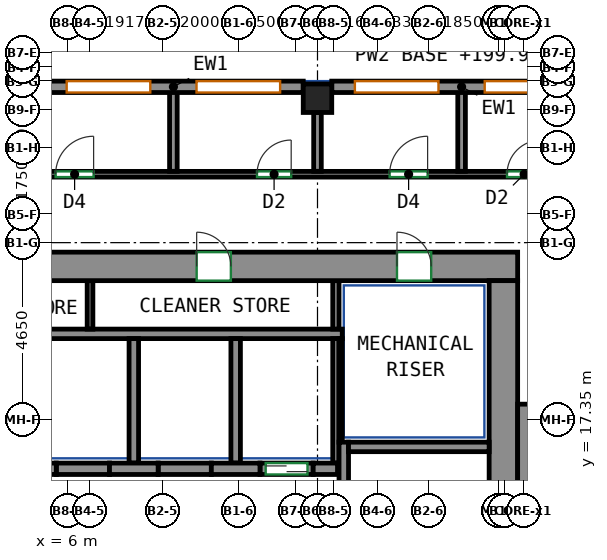
"""IFC4 building model, lengths in metres.
Left out: names, types, materials, properties, quantities, classifications, styles, units other than length and angle.
Written with IfcOpenShell. Run it as: python <this file> out.ifc"""

import sys

from ifc_helpers import new_model, si_unit, direction, frame, frame_2d, origin, origin_2d, place, context, subcontext, project, spatial, rectangle, extrude, source, transform, mapped, element, fill, save


model = new_model("IFC4")
c1 = context("Model", 3, precision=1e-05, world=origin(), true_north=direction((0.0, 1.0)))
c2 = subcontext(c1, "Body", "Model", "MODEL_VIEW")
j1 = project(units=[si_unit("LENGTHUNIT", "METRE"), si_unit("PLANEANGLEUNIT", "RADIAN")], contexts=[c1])
p1 = place(None, origin())
s1 = spatial("IfcSite", under=j1, at=p1, CompositionType="ELEMENT")
p2 = place(p1, origin())
s2 = spatial("IfcBuilding", under=s1, at=p2, CompositionType="ELEMENT")
p3 = place(p2, frame((0.0, 0.0, 199.9)))
s3 = spatial("IfcBuildingStorey", under=s2, at=p3, CompositionType="ELEMENT", Elevation=199.9)
m1 = source(origin(), c2, "Body", "SweptSolid", [
    extrude(rectangle(XDim=0.75, YDim=0.75, at=origin_2d()), origin(), (0.0, 0.0, 1.0), 3.12),
])
p4 = place(p3, frame((12.583, 25.8, 0.0), z_axis=(0.0, 0.0, 1.0), x_axis=(1.0, 0.0, 0.0)))
e1 = element("IfcColumn", 1, at=p4, inside=s3, PredefinedType="COLUMN", context=c2, shape_type="MappedRepresentation", body=[
    mapped(m1, transform((0.0, 0.0, 0.0))),
])
m2 = source(origin(), c2, "Body", "SweptSolid", [
    extrude(rectangle(XDim=33.6, YDim=0.75, at=frame_2d((16.8, 0.0))), origin(), (0.0, 0.0, 1.0), 3.12),
])
p5 = place(p3, frame((-15.75, 21.375, 0.0), z_axis=(0.0, 0.0, 1.0), x_axis=(1.0, 0.0, 0.0)))
e2 = element("IfcWall", 2, at=p5, inside=s3, PredefinedType="SHEAR", context=c2, shape_type="MappedRepresentation", body=[
    mapped(m2, transform((0.0, 0.0, 0.0))),
])
p6 = place(p5, frame((8.27, 0.0, 0.0)))
e3 = element("IfcOpeningElement", 3, at=p6, cuts=e2, PredefinedType="OPENING", context=c2, shape_type="SweptSolid", body=[
    extrude(rectangle(XDim=0.9, YDim=2.1, at=frame_2d((0.45, 1.05))), frame((0.0, 0.385, 0.0), z_axis=(0.0, -1.0, 0.0), x_axis=(1.0, 0.0, 0.0)), (0.0, 0.0, 1.0), 0.77),
])
p7 = place(p5, frame((14.97, 0.0, 0.0)))
e4 = element("IfcOpeningElement", 4, at=p7, cuts=e2, PredefinedType="OPENING", context=c2, shape_type="SweptSolid", body=[
    extrude(rectangle(XDim=0.9, YDim=2.1, at=frame_2d((0.45, 1.05))), frame((0.0, 0.385, 0.0), z_axis=(0.0, -1.0, 0.0), x_axis=(1.0, 0.0, 0.0)), (0.0, 0.0, 1.0), 0.77),
])
p8 = place(p5, frame((19.794, 0.0, 0.0)))
e5 = element("IfcOpeningElement", 5, at=p8, cuts=e2, PredefinedType="OPENING", context=c2, shape_type="SweptSolid", body=[
    extrude(rectangle(XDim=0.9, YDim=2.1, at=frame_2d((0.45, 1.05))), frame((0.0, 0.385, 0.0), z_axis=(0.0, -1.0, 0.0), x_axis=(1.0, 0.0, 0.0)), (0.0, 0.0, 1.0), 0.77),
])
p9 = place(p5, frame((25.154, 0.0, 0.0)))
e6 = element("IfcOpeningElement", 6, at=p9, cuts=e2, PredefinedType="OPENING", context=c2, shape_type="SweptSolid", body=[
    extrude(rectangle(XDim=0.9, YDim=2.1, at=frame_2d((0.45, 1.05))), frame((0.0, 0.385, 0.0), z_axis=(0.0, -1.0, 0.0), x_axis=(1.0, 0.0, 0.0)), (0.0, 0.0, 1.0), 0.77),
])
p10 = place(p5, frame((2.275, 0.0, 0.0)))
e7 = element("IfcOpeningElement", 7, at=p10, cuts=e2, PredefinedType="OPENING", context=c2, shape_type="SweptSolid", body=[
    extrude(rectangle(XDim=0.9, YDim=2.1, at=frame_2d((0.45, 1.05))), frame((0.0, 0.385, 0.0), z_axis=(0.0, -1.0, 0.0), x_axis=(1.0, 0.0, 0.0)), (0.0, 0.0, 1.0), 0.77),
])
p11 = place(p5, frame((30.425, 0.0, 0.0)))
e8 = element("IfcOpeningElement", 8, at=p11, cuts=e2, PredefinedType="OPENING", context=c2, shape_type="SweptSolid", body=[
    extrude(rectangle(XDim=0.9, YDim=2.1, at=frame_2d((0.45, 1.05))), frame((0.0, 0.385, 0.0), z_axis=(0.0, -1.0, 0.0), x_axis=(1.0, 0.0, 0.0)), (0.0, 0.0, 1.0), 0.77),
])
m3 = source(origin(), c2, "Body", "SweptSolid", [
    extrude(rectangle(XDim=12.0, YDim=0.75, at=frame_2d((6.0, 0.0))), origin(), (0.0, 0.0, 1.0), 3.12),
])
p12 = place(p3, frame((17.475, 9.0, 0.0), z_axis=(0.0, 0.0, 1.0), x_axis=(0.0, 1.0, 0.0)))
e9 = element("IfcWall", 9, at=p12, inside=s3, PredefinedType="SHEAR", context=c2, shape_type="MappedRepresentation", body=[
    mapped(m3, transform((0.0, 0.0, 0.0))),
])
m4 = source(origin(), c2, "Body", "SweptSolid", [
    extrude(rectangle(XDim=7.75, YDim=0.25, at=frame_2d((3.875, 0.0))), origin(), (0.0, 0.0, 1.0), 3.12),
])
p13 = place(p3, frame((13.275, 9.0, 0.0), z_axis=(0.0, 0.0, 1.0), x_axis=(0.0, 1.0, 0.0)))
e10 = element("IfcWall", 10, at=p13, inside=s3, PredefinedType="SHEAR", context=c2, shape_type="MappedRepresentation", body=[
    mapped(m4, transform((0.0, 0.0, 0.0))),
])
m5 = source(origin(), c2, "Body", "SweptSolid", [
    extrude(rectangle(XDim=3.7, YDim=0.25, at=frame_2d((1.85, 0.0))), origin(), (0.0, 0.0, 1.0), 3.12),
])
p14 = place(p3, frame((13.4, 16.625, 0.0), z_axis=(0.0, 0.0, 1.0), x_axis=(1.0, 0.0, 0.0)))
e11 = element("IfcWall", 11, at=p14, inside=s3, PredefinedType="SHEAR", context=c2, shape_type="MappedRepresentation", body=[
    mapped(m5, transform((0.0, 0.0, 0.0))),
])
m6 = source(origin(), c2, "Body", "SweptSolid", [
    extrude(rectangle(XDim=8.0, YDim=0.5, at=frame_2d((4.0, 0.0))), origin(), (0.0, 0.0, 1.0), 3.12),
])
p15 = place(p3, frame((18.1, 9.75, 0.0), z_axis=(0.0, 0.0, 1.0), x_axis=(0.0, 1.0, 0.0)))
e12 = element("IfcWall", 12, at=p15, inside=s3, PredefinedType="SHEAR", context=c2, shape_type="MappedRepresentation", body=[
    mapped(m6, transform((0.0, 0.0, 0.0))),
])
m7 = source(origin(), c2, "Body", "SweptSolid", [
    extrude(rectangle(XDim=1.28, YDim=0.3, at=frame_2d((0.64, 0.0))), origin(), (0.0, 0.0, 1.0), 3.12),
])
p16 = place(p3, frame((4.43, 16.05, 0.0), z_axis=(0.0, 0.0, 1.0), x_axis=(1.0, 0.0, 0.0)))
e13 = element("IfcWall", 13, at=p16, inside=s3, PredefinedType="SHEAR", context=c2, shape_type="MappedRepresentation", body=[
    mapped(m7, transform((0.0, 0.0, 0.0))),
])
m8 = source(origin(), c2, "Body", "SweptSolid", [
    extrude(rectangle(XDim=1.28, YDim=0.3, at=frame_2d((0.64, 0.0))), origin(), (0.0, 0.0, 1.0), 3.12),
])
p17 = place(p3, frame((7.11, 16.05, 0.0), z_axis=(0.0, 0.0, 1.0), x_axis=(1.0, 0.0, 0.0)))
e14 = element("IfcWall", 14, at=p17, inside=s3, PredefinedType="SHEAR", context=c2, shape_type="MappedRepresentation", body=[
    mapped(m8, transform((0.0, 0.0, 0.0))),
])
p18 = place(p3, frame((9.79, 16.05, 0.0), z_axis=(0.0, 0.0, 1.0), x_axis=(1.0, 0.0, 0.0)))
e15 = element("IfcWall", 15, at=p18, inside=s3, PredefinedType="SHEAR", context=c2, shape_type="MappedRepresentation", body=[
    mapped(m7, transform((0.0, 0.0, 0.0))),
])
m9 = source(origin(), c2, "Body", "SweptSolid", [
    extrude(rectangle(XDim=0.64, YDim=0.3, at=frame_2d((0.32, 0.0))), origin(), (0.0, 0.0, 1.0), 3.12),
])
p19 = place(p3, frame((12.47, 16.05, 0.0), z_axis=(0.0, 0.0, 1.0), x_axis=(1.0, 0.0, 0.0)))
e16 = element("IfcWall", 16, at=p19, inside=s3, PredefinedType="SHEAR", context=c2, shape_type="MappedRepresentation", body=[
    mapped(m9, transform((0.0, 0.0, 0.0))),
])
m10 = source(origin(), c2, "Body", "SweptSolid", [
    extrude(rectangle(XDim=6.833, YDim=0.3, at=frame_2d((3.417, 0.0))), origin(), (0.0, 0.0, 1.0), 3.12),
])
p20 = place(p3, frame((19.792, 26.1, 0.0), z_axis=(0.0, 0.0, 1.0), x_axis=(-1.0, 0.0, 0.0)))
e17 = element("IfcWall", 17, at=p20, inside=s3, PredefinedType="SOLIDWALL", context=c2, shape_type="MappedRepresentation", body=[
    mapped(m10, transform((0.0, 0.0, 0.0))),
])
p21 = place(p20, frame((0.608, 0.0, 0.85)))
e18 = element("IfcOpeningElement", 18, at=p21, cuts=e17, PredefinedType="OPENING", context=c2, shape_type="SweptSolid", body=[
    extrude(rectangle(XDim=2.2, YDim=1.95, at=frame_2d((1.1, 0.975))), frame((0.0, 0.16, 0.0), z_axis=(0.0, -1.0, 0.0), x_axis=(1.0, 0.0, 0.0)), (0.0, 0.0, 1.0), 0.32),
])
p22 = place(p20, frame((4.025, 0.0, 0.85)))
e19 = element("IfcOpeningElement", 19, at=p22, cuts=e17, PredefinedType="OPENING", context=c2, shape_type="SweptSolid", body=[
    extrude(rectangle(XDim=2.2, YDim=1.95, at=frame_2d((1.1, 0.975))), frame((0.0, 0.16, 0.0), z_axis=(0.0, -1.0, 0.0), x_axis=(1.0, 0.0, 0.0)), (0.0, 0.0, 1.0), 0.32),
])
m11 = source(origin(), c2, "Body", "SweptSolid", [
    extrude(rectangle(XDim=6.833, YDim=0.3, at=frame_2d((3.417, 0.0))), origin(), (0.0, 0.0, 1.0), 3.12),
])
p23 = place(p3, frame((12.208, 26.1, 0.0), z_axis=(0.0, 0.0, 1.0), x_axis=(-1.0, 0.0, 0.0)))
e20 = element("IfcWall", 20, at=p23, inside=s3, PredefinedType="SOLIDWALL", context=c2, shape_type="MappedRepresentation", body=[
    mapped(m11, transform((0.0, 0.0, 0.0))),
])
p24 = place(p23, frame((0.608, 0.0, 0.85)))
e21 = element("IfcOpeningElement", 21, at=p24, cuts=e20, PredefinedType="OPENING", context=c2, shape_type="SweptSolid", body=[
    extrude(rectangle(XDim=2.2, YDim=1.95, at=frame_2d((1.1, 0.975))), frame((0.0, 0.16, 0.0), z_axis=(0.0, -1.0, 0.0), x_axis=(1.0, 0.0, 0.0)), (0.0, 0.0, 1.0), 0.32),
])
p25 = place(p23, frame((4.025, 0.0, 0.85)))
e22 = element("IfcOpeningElement", 22, at=p25, cuts=e20, PredefinedType="OPENING", context=c2, shape_type="SweptSolid", body=[
    extrude(rectangle(XDim=2.2, YDim=1.95, at=frame_2d((1.1, 0.975))), frame((0.0, 0.16, 0.0), z_axis=(0.0, -1.0, 0.0), x_axis=(1.0, 0.0, 0.0)), (0.0, 0.0, 1.0), 0.32),
])
m12 = source(origin(), c2, "Body", "SweptSolid", [
    extrude(rectangle(XDim=1.4, YDim=0.3, at=frame_2d((0.7, 0.0))), origin(), (0.0, 0.0, 1.0), 3.12),
])
p26 = place(p3, frame((11.07, 16.05, 0.0), z_axis=(0.0, 0.0, 1.0), x_axis=(1.0, 0.0, 0.0)))
e23 = element("IfcWall", 23, at=p26, inside=s3, PredefinedType="PARTITIONING", context=c2, shape_type="MappedRepresentation", body=[
    mapped(m12, transform((0.0, 0.0, 0.0))),
])
p27 = place(p26, frame((0.15, 0.0, 0.0)))
e24 = element("IfcOpeningElement", 24, at=p27, cuts=e23, PredefinedType="OPENING", context=c2, shape_type="SweptSolid", body=[
    extrude(rectangle(XDim=1.1, YDim=2.1, at=frame_2d((0.55, 1.05))), frame((0.0, 0.16, 0.0), z_axis=(0.0, -1.0, 0.0), x_axis=(1.0, 0.0, 0.0)), (0.0, 0.0, 1.0), 0.32),
])
m13 = source(origin(), c2, "Body", "SweptSolid", [
    extrude(rectangle(XDim=1.4, YDim=0.3, at=frame_2d((0.7, 0.0))), origin(), (0.0, 0.0, 1.0), 3.12),
])
for number, where, z_axis, x_axis in (
    (25, (5.71, 16.05, 0.0), (0.0, 0.0, 1.0), (1.0, 0.0, 0.0)),
    (26, (8.39, 16.05, 0.0), (0.0, 0.0, 1.0), (1.0, 0.0, 0.0)),
):
    element("IfcWall", number, at=place(p3, frame(where, z_axis=z_axis, x_axis=x_axis)), inside=s3, PredefinedType="PARTITIONING", context=c2, shape_type="MappedRepresentation", body=[
        mapped(m13, transform((0.0, 0.0, 0.0))),
    ])
m14 = source(origin(), c2, "Body", "SweptSolid", [
    extrude(rectangle(XDim=10.97, YDim=0.25, at=frame_2d((5.485, 0.0))), origin(), (0.0, 0.0, 1.0), 3.12),
])
p28 = place(p3, frame((2.265, 19.6, 0.0), z_axis=(0.0, 0.0, 1.0), x_axis=(1.0, 0.0, 0.0)))
e27 = element("IfcWall", 27, at=p28, inside=s3, PredefinedType="PARTITIONING", context=c2, shape_type="MappedRepresentation", body=[
    mapped(m14, transform((0.0, 0.0, 0.0))),
])
m15 = source(origin(), c2, "Body", "SweptSolid", [
    extrude(rectangle(XDim=3.275, YDim=0.165, at=frame_2d((1.638, 0.0))), origin(), (0.0, 0.0, 1.0), 3.12),
])
p29 = place(p3, frame((13.067, 16.2, 0.0), z_axis=(0.0, 0.0, 1.0), x_axis=(0.0, 1.0, 0.0)))
e28 = element("IfcWall", 28, at=p29, inside=s3, PredefinedType="PARTITIONING", context=c2, shape_type="MappedRepresentation", body=[
    mapped(m15, transform((0.0, 0.0, 0.0))),
])
m16 = source(origin(), c2, "Body", "SweptSolid", [
    extrude(rectangle(XDim=1.275, YDim=0.165, at=frame_2d((0.637, 0.0))), origin(), (0.0, 0.0, 1.0), 3.12),
])
p30 = place(p3, frame((13.067, 19.725, 0.0), z_axis=(0.0, 0.0, 1.0), x_axis=(0.0, 1.0, 0.0)))
e29 = element("IfcWall", 29, at=p30, inside=s3, PredefinedType="PARTITIONING", context=c2, shape_type="MappedRepresentation", body=[
    mapped(m16, transform((0.0, 0.0, 0.0))),
])
m17 = source(origin(), c2, "Body", "SweptSolid", [
    extrude(rectangle(XDim=3.275, YDim=0.25, at=frame_2d((1.638, 0.0))), origin(), (0.0, 0.0, 1.0), 3.12),
])
p31 = place(p3, frame((10.43, 16.2, 0.0), z_axis=(0.0, 0.0, 1.0), x_axis=(0.0, 1.0, 0.0)))
e30 = element("IfcWall", 30, at=p31, inside=s3, PredefinedType="PARTITIONING", context=c2, shape_type="MappedRepresentation", body=[
    mapped(m17, transform((0.0, 0.0, 0.0))),
])
m18 = source(origin(), c2, "Body", "SweptSolid", [
    extrude(rectangle(XDim=2.725, YDim=0.085, at=frame_2d((1.363, 0.0))), origin(), (0.0, 0.0, 1.0), 3.12),
])
p32 = place(p3, frame((13.192, 16.75, 0.0), z_axis=(0.0, 0.0, 1.0), x_axis=(0.0, 1.0, 0.0)))
e31 = element("IfcWall", 31, at=p32, inside=s3, PredefinedType="PARTITIONING", context=c2, shape_type="MappedRepresentation", body=[
    mapped(m18, transform((0.0, 0.0, 0.0))),
])
p33 = place(p3, frame((7.75, 16.2, 0.0), z_axis=(0.0, 0.0, 1.0), x_axis=(0.0, 1.0, 0.0)))
e32 = element("IfcWall", 32, at=p33, inside=s3, PredefinedType="PARTITIONING", context=c2, shape_type="MappedRepresentation", body=[
    mapped(m17, transform((0.0, 0.0, 0.0))),
])
m19 = source(origin(), c2, "Body", "SweptSolid", [
    extrude(rectangle(XDim=1.275, YDim=0.15, at=frame_2d((0.637, 0.0))), origin(), (0.0, 0.0, 1.0), 3.12),
])
p34 = place(p3, frame((6.598, 19.725, 0.0), z_axis=(0.0, 0.0, 1.0), x_axis=(0.0, 1.0, 0.0)))
e33 = element("IfcWall", 33, at=p34, inside=s3, PredefinedType="PARTITIONING", context=c2, shape_type="MappedRepresentation", body=[
    mapped(m19, transform((0.0, 0.0, 0.0))),
])
p35 = place(p3, frame((-17.85, 23.8, 0.0), z_axis=(0.0, 0.0, 1.0), x_axis=(1.0, 0.0, 0.0)))
e34 = element("IfcWall", 34, at=p35, inside=s3, PredefinedType="PARTITIONING", context=c2, shape_type="SweptSolid", body=[
    extrude(rectangle(XDim=45.7, YDim=0.15, at=frame_2d((22.85, 0.0))), origin(), (0.0, 0.0, 1.0), 3.12),
])
p36 = place(p35, frame((0.6, 0.0, 0.0)))
e35 = element("IfcOpeningElement", 35, at=p36, cuts=e34, PredefinedType="OPENING", context=c2, shape_type="SweptSolid", body=[
    extrude(rectangle(XDim=0.9, YDim=2.1, at=frame_2d((0.45, 1.05))), frame((0.0, 0.085, 0.0), z_axis=(0.0, -1.0, 0.0), x_axis=(1.0, 0.0, 0.0)), (0.0, 0.0, 1.0), 0.17),
])
p37 = place(p35, frame((4.081, 0.0, 0.0)))
e36 = element("IfcOpeningElement", 36, at=p37, cuts=e34, PredefinedType="OPENING", context=c2, shape_type="SweptSolid", body=[
    extrude(rectangle(XDim=1.0, YDim=2.1, at=frame_2d((0.5, 1.05))), frame((0.0, 0.085, 0.0), z_axis=(0.0, -1.0, 0.0), x_axis=(1.0, 0.0, 0.0)), (0.0, 0.0, 1.0), 0.17),
])
p38 = place(p35, frame((9.481, 0.0, 0.0)))
e37 = element("IfcOpeningElement", 37, at=p38, cuts=e34, PredefinedType="OPENING", context=c2, shape_type="SweptSolid", body=[
    extrude(rectangle(XDim=0.9, YDim=2.1, at=frame_2d((0.45, 1.05))), frame((0.0, 0.085, 0.0), z_axis=(0.0, -1.0, 0.0), x_axis=(1.0, 0.0, 0.0)), (0.0, 0.0, 1.0), 0.17),
])
p39 = place(p35, frame((12.803, 0.0, 0.0)))
e38 = element("IfcOpeningElement", 38, at=p39, cuts=e34, PredefinedType="OPENING", context=c2, shape_type="SweptSolid", body=[
    extrude(rectangle(XDim=1.0, YDim=2.1, at=frame_2d((0.5, 1.05))), frame((0.0, 0.085, 0.0), z_axis=(0.0, -1.0, 0.0), x_axis=(1.0, 0.0, 0.0)), (0.0, 0.0, 1.0), 0.17),
])
p40 = place(p35, frame((15.489, 0.0, 0.0)))
e39 = element("IfcOpeningElement", 39, at=p40, cuts=e34, PredefinedType="OPENING", context=c2, shape_type="SweptSolid", body=[
    extrude(rectangle(XDim=0.9, YDim=2.1, at=frame_2d((0.45, 1.05))), frame((0.0, 0.085, 0.0), z_axis=(0.0, -1.0, 0.0), x_axis=(1.0, 0.0, 0.0)), (0.0, 0.0, 1.0), 0.17),
])
p41 = place(p35, frame((21.244, 0.0, 0.0)))
e40 = element("IfcOpeningElement", 40, at=p41, cuts=e34, PredefinedType="OPENING", context=c2, shape_type="SweptSolid", body=[
    extrude(rectangle(XDim=0.9, YDim=2.1, at=frame_2d((0.45, 1.05))), frame((0.0, 0.085, 0.0), z_axis=(0.0, -1.0, 0.0), x_axis=(1.0, 0.0, 0.0)), (0.0, 0.0, 1.0), 0.17),
])
p42 = place(p35, frame((23.542, 0.0, 0.0)))
e41 = element("IfcOpeningElement", 41, at=p42, cuts=e34, PredefinedType="OPENING", context=c2, shape_type="SweptSolid", body=[
    extrude(rectangle(XDim=1.0, YDim=2.1, at=frame_2d((0.5, 1.05))), frame((0.0, 0.085, 0.0), z_axis=(0.0, -1.0, 0.0), x_axis=(1.0, 0.0, 0.0)), (0.0, 0.0, 1.0), 0.17),
])
p43 = place(p35, frame((28.841, 0.0, 0.0)))
e42 = element("IfcOpeningElement", 42, at=p43, cuts=e34, PredefinedType="OPENING", context=c2, shape_type="SweptSolid", body=[
    extrude(rectangle(XDim=0.9, YDim=2.1, at=frame_2d((0.45, 1.05))), frame((0.0, 0.085, 0.0), z_axis=(0.0, -1.0, 0.0), x_axis=(1.0, 0.0, 0.0)), (0.0, 0.0, 1.0), 0.17),
])
p44 = place(p35, frame((32.331, 0.0, 0.0)))
e43 = element("IfcOpeningElement", 43, at=p44, cuts=e34, PredefinedType="OPENING", context=c2, shape_type="SweptSolid", body=[
    extrude(rectangle(XDim=1.0, YDim=2.1, at=frame_2d((0.5, 1.05))), frame((0.0, 0.085, 0.0), z_axis=(0.0, -1.0, 0.0), x_axis=(1.0, 0.0, 0.0)), (0.0, 0.0, 1.0), 0.17),
])
p45 = place(p35, frame((35.42, 0.0, 0.0)))
e44 = element("IfcOpeningElement", 44, at=p45, cuts=e34, PredefinedType="OPENING", context=c2, shape_type="SweptSolid", body=[
    extrude(rectangle(XDim=0.9, YDim=2.1, at=frame_2d((0.45, 1.05))), frame((0.0, 0.085, 0.0), z_axis=(0.0, -1.0, 0.0), x_axis=(1.0, 0.0, 0.0)), (0.0, 0.0, 1.0), 0.17),
])
p46 = place(p35, frame((40.317, 0.0, 0.0)))
e45 = element("IfcOpeningElement", 45, at=p46, cuts=e34, PredefinedType="OPENING", context=c2, shape_type="SweptSolid", body=[
    extrude(rectangle(XDim=0.9, YDim=2.1, at=frame_2d((0.45, 1.05))), frame((0.0, 0.085, 0.0), z_axis=(0.0, -1.0, 0.0), x_axis=(1.0, 0.0, 0.0)), (0.0, 0.0, 1.0), 0.17),
])
p47 = place(p35, frame((43.199, 0.0, 0.0)))
e46 = element("IfcOpeningElement", 46, at=p47, cuts=e34, PredefinedType="OPENING", context=c2, shape_type="SweptSolid", body=[
    extrude(rectangle(XDim=1.0, YDim=2.1, at=frame_2d((0.5, 1.05))), frame((0.0, 0.085, 0.0), z_axis=(0.0, -1.0, 0.0), x_axis=(1.0, 0.0, 0.0)), (0.0, 0.0, 1.0), 0.17),
])
p48 = place(p3, frame((8.791, 23.877, 0.0), z_axis=(0.0, 0.0, 1.0), x_axis=(0.0, 1.0, 0.0)))
e47 = element("IfcWall", 47, at=p48, inside=s3, PredefinedType="PARTITIONING", context=c2, shape_type="SweptSolid", body=[
    extrude(rectangle(XDim=2.123, YDim=0.2, at=frame_2d((1.062, 0.0))), origin(), (0.0, 0.0, 1.0), 3.12),
])
p49 = place(p3, frame((12.583, 23.877, 0.0), z_axis=(0.0, 0.0, 1.0), x_axis=(0.0, 1.0, 0.0)))
e48 = element("IfcWall", 48, at=p49, inside=s3, PredefinedType="PARTITIONING", context=c2, shape_type="SweptSolid", body=[
    extrude(rectangle(XDim=1.548, YDim=0.2, at=frame_2d((0.774, 0.0))), origin(), (0.0, 0.0, 1.0), 3.12),
])
p50 = place(p3, frame((16.375, 23.877, 0.0), z_axis=(0.0, 0.0, 1.0), x_axis=(0.0, 1.0, 0.0)))
e49 = element("IfcWall", 49, at=p50, inside=s3, PredefinedType="PARTITIONING", context=c2, shape_type="SweptSolid", body=[
    extrude(rectangle(XDim=2.123, YDim=0.2, at=frame_2d((1.062, 0.0))), origin(), (0.0, 0.0, 1.0), 3.12),
])
p51 = place(p21, origin())
e50 = element("IfcWindow", 50, at=p51, inside=s3, PartitioningType="SINGLE_PANEL", PredefinedType="WINDOW", context=c2, shape_type="SweptSolid", body=[
    extrude(rectangle(XDim=2.2, YDim=1.95, at=frame_2d((1.1, 0.975))), frame((0.0, 0.03, 0.0), z_axis=(0.0, -1.0, 0.0), x_axis=(1.0, 0.0, 0.0)), (0.0, 0.0, 1.0), 0.06),
])
fill(e18, e50)
p52 = place(p22, origin())
e51 = element("IfcWindow", 51, at=p52, inside=s3, PartitioningType="SINGLE_PANEL", PredefinedType="WINDOW", context=c2, shape_type="SweptSolid", body=[
    extrude(rectangle(XDim=2.2, YDim=1.95, at=frame_2d((1.1, 0.975))), frame((0.0, 0.03, 0.0), z_axis=(0.0, -1.0, 0.0), x_axis=(1.0, 0.0, 0.0)), (0.0, 0.0, 1.0), 0.06),
])
fill(e19, e51)
p53 = place(p24, origin())
e52 = element("IfcWindow", 52, at=p53, inside=s3, PartitioningType="SINGLE_PANEL", PredefinedType="WINDOW", context=c2, shape_type="SweptSolid", body=[
    extrude(rectangle(XDim=2.2, YDim=1.95, at=frame_2d((1.1, 0.975))), frame((0.0, 0.03, 0.0), z_axis=(0.0, -1.0, 0.0), x_axis=(1.0, 0.0, 0.0)), (0.0, 0.0, 1.0), 0.06),
])
fill(e21, e52)
p54 = place(p25, origin())
e53 = element("IfcWindow", 53, at=p54, inside=s3, PartitioningType="SINGLE_PANEL", PredefinedType="WINDOW", context=c2, shape_type="SweptSolid", body=[
    extrude(rectangle(XDim=2.2, YDim=1.95, at=frame_2d((1.1, 0.975))), frame((0.0, 0.03, 0.0), z_axis=(0.0, -1.0, 0.0), x_axis=(1.0, 0.0, 0.0)), (0.0, 0.0, 1.0), 0.06),
])
fill(e22, e53)
p55 = place(p27, origin())
e54 = element("IfcDoor", 54, at=p55, inside=s3, OperationType="DOUBLE_DOOR_SLIDING", PredefinedType="DOOR", context=c2, shape_type="SweptSolid", body=[
    extrude(rectangle(XDim=1.1, YDim=2.1, at=frame_2d((0.55, 1.05))), frame((0.0, 0.025, 0.0), z_axis=(0.0, -1.0, 0.0), x_axis=(1.0, 0.0, 0.0)), (0.0, 0.0, 1.0), 0.05),
])
fill(e24, e54)
p56 = place(p9, origin())
e55 = element("IfcDoor", 55, at=p56, inside=s3, OperationType="SINGLE_SWING_LEFT", PredefinedType="DOOR", context=c2, shape_type="SweptSolid", body=[
    extrude(rectangle(XDim=0.9, YDim=2.1, at=frame_2d((0.45, 1.05))), frame((0.0, -0.23, 0.0), z_axis=(0.0, -1.0, 0.0), x_axis=(1.0, 0.0, 0.0)), (0.0, 0.0, 1.0), 0.05),
])
fill(e6, e55)
p57 = place(p11, origin())
e56 = element("IfcDoor", 56, at=p57, inside=s3, OperationType="SINGLE_SWING_LEFT", PredefinedType="DOOR", context=c2, shape_type="SweptSolid", body=[
    extrude(rectangle(XDim=0.9, YDim=2.1, at=frame_2d((0.45, 1.05))), frame((0.0, -0.23, 0.0), z_axis=(0.0, -1.0, 0.0), x_axis=(1.0, 0.0, 0.0)), (0.0, 0.0, 1.0), 0.05),
])
fill(e8, e56)
p58 = place(p42, origin())
e57 = element("IfcDoor", 57, at=p58, inside=s3, OperationType="SINGLE_SWING_RIGHT", PredefinedType="DOOR", context=c2, shape_type="SweptSolid", body=[
    extrude(rectangle(XDim=1.0, YDim=2.1, at=frame_2d((0.5, 1.05))), frame((0.0, 0.025, 0.0), z_axis=(0.0, -1.0, 0.0), x_axis=(1.0, 0.0, 0.0)), (0.0, 0.0, 1.0), 0.05),
])
fill(e41, e57)
p59 = place(p43, origin())
e58 = element("IfcDoor", 58, at=p59, inside=s3, OperationType="SINGLE_SWING_RIGHT", PredefinedType="DOOR", context=c2, shape_type="SweptSolid", body=[
    extrude(rectangle(XDim=0.9, YDim=2.1, at=frame_2d((0.45, 1.05))), frame((0.0, 0.025, 0.0), z_axis=(0.0, -1.0, 0.0), x_axis=(1.0, 0.0, 0.0)), (0.0, 0.0, 1.0), 0.05),
])
fill(e42, e58)
p60 = place(p44, origin())
e59 = element("IfcDoor", 59, at=p60, inside=s3, OperationType="SINGLE_SWING_RIGHT", PredefinedType="DOOR", context=c2, shape_type="SweptSolid", body=[
    extrude(rectangle(XDim=1.0, YDim=2.1, at=frame_2d((0.5, 1.05))), frame((0.0, 0.025, 0.0), z_axis=(0.0, -1.0, 0.0), x_axis=(1.0, 0.0, 0.0)), (0.0, 0.0, 1.0), 0.05),
])
fill(e43, e59)
p61 = place(p45, origin())
e60 = element("IfcDoor", 60, at=p61, inside=s3, OperationType="SINGLE_SWING_RIGHT", PredefinedType="DOOR", context=c2, shape_type="SweptSolid", body=[
    extrude(rectangle(XDim=0.9, YDim=2.1, at=frame_2d((0.45, 1.05))), frame((0.0, 0.025, 0.0), z_axis=(0.0, -1.0, 0.0), x_axis=(1.0, 0.0, 0.0)), (0.0, 0.0, 1.0), 0.05),
])
fill(e44, e60)
save(model, sys.argv[1])
